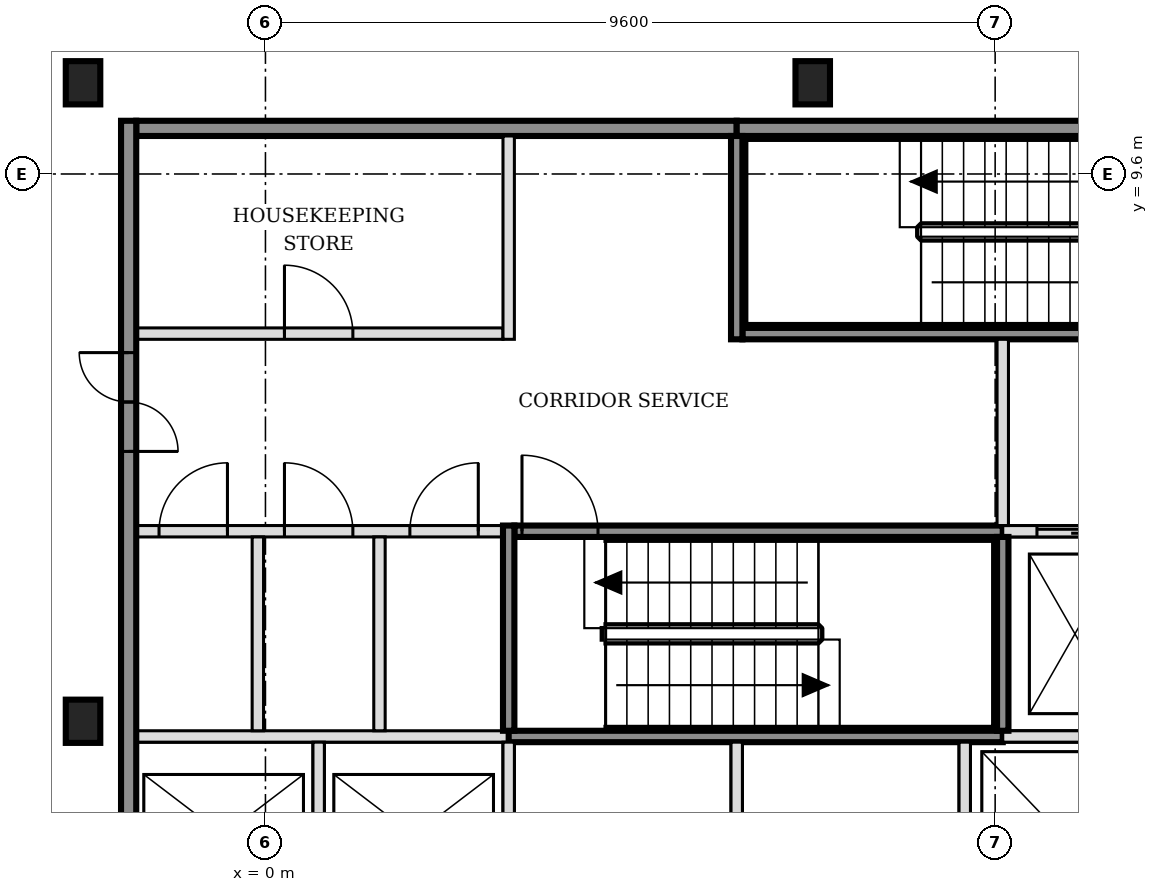
"""IFC4 building model, lengths in metres.
Left out: names, types, materials, properties, quantities, classifications, styles, units other than length and angle.
Written with IfcOpenShell. Run it as: python <this file> out.ifc"""

import sys

from ifc_helpers import new_model, si_unit, direction, frame, frame_2d, origin, origin_2d, place, context, subcontext, project, spatial, rectangle, i_section, extrude, element, fill, save


model = new_model("IFC4")
c1 = context("Model", 3, precision=1e-05, world=origin(), true_north=direction((0.0, 1.0)))
c2 = subcontext(c1, "Body", "Model", "MODEL_VIEW")
j1 = project(units=[si_unit("LENGTHUNIT", "METRE"), si_unit("PLANEANGLEUNIT", "RADIAN")], contexts=[c1])
p1 = place(None, origin())
s1 = spatial("IfcSite", under=j1, at=p1, CompositionType="ELEMENT")
p2 = place(p1, origin())
s2 = spatial("IfcBuilding", under=s1, at=p2, CompositionType="ELEMENT")
p3 = place(p2, frame((0.0, 0.0, 61.8)))
s3 = spatial("IfcBuildingStorey", under=s2, at=p3, CompositionType="ELEMENT", Elevation=61.8)
for number, where, z_axis, x_axis in (
    (1, (-2.4, 2.4, -0.15), (0.0, 0.0, 1.0), (1.0, 0.0, 0.0)),
    (2, (-2.4, 10.8, -0.15), (0.0, 0.0, 1.0), (1.0, 0.0, 0.0)),
    (3, (7.2, 10.8, -0.15), (0.0, 0.0, 1.0), (1.0, 0.0, 0.0)),
):
    element("IfcColumn", number, at=place(p3, frame(where, z_axis=z_axis, x_axis=x_axis)), inside=s3, PredefinedType="COLUMN", context=c2, shape_type="SweptSolid", body=[
        extrude(i_section(OverallWidth=0.454, OverallDepth=0.569, WebThickness=0.078, FlangeThickness=0.125, FilletRadius=0.015, at=origin_2d()), origin(), (0.0, 0.0, 1.0), 3.6),
    ])
p4 = place(p3, frame((-1.7, 2.2, 0.0), z_axis=(0.0, 0.0, 1.0), x_axis=(1.0, 0.0, 0.0)))
e4 = element("IfcWall", 4, at=p4, inside=s3, PredefinedType="SOLIDWALL", context=c2, shape_type="SweptSolid", body=[
    extrude(rectangle(XDim=4.9, YDim=0.15, at=frame_2d((2.45, 0.0))), origin(), (0.0, 0.0, 1.0), 3.45),
])
p5 = place(p3, frame((3.2, 2.2, 0.0), z_axis=(0.0, 0.0, 1.0), x_axis=(1.0, 0.0, 0.0)))
e5 = element("IfcWall", 5, at=p5, inside=s3, PredefinedType="SOLIDWALL", context=c2, shape_type="SweptSolid", body=[
    extrude(rectangle(XDim=6.5, YDim=0.15, at=frame_2d((3.25, 0.0))), origin(), (0.0, 0.0, 1.0), 3.45),
])
p6 = place(p3, frame((9.7, 2.2, 0.0), z_axis=(0.0, 0.0, 1.0), x_axis=(1.0, 0.0, 0.0)))
e6 = element("IfcWall", 6, at=p6, inside=s3, PredefinedType="SOLIDWALL", context=c2, shape_type="SweptSolid", body=[
    extrude(rectangle(XDim=4.525, YDim=0.15, at=frame_2d((2.263, 0.0))), origin(), (0.0, 0.0, 1.0), 3.45),
])
p7 = place(p3, frame((-1.7, 4.9, 0.0), z_axis=(0.0, 0.0, 1.0), x_axis=(1.0, 0.0, 0.0)))
e7 = element("IfcWall", 7, at=p7, inside=s3, PredefinedType="PARTITIONING", context=c2, shape_type="SweptSolid", body=[
    extrude(rectangle(XDim=4.825, YDim=0.15, at=frame_2d((2.413, 0.0))), origin(), (0.0, 0.0, 1.0), 3.45),
])
p8 = place(p7, frame((0.3, 0.0, 0.0)))
e8 = element("IfcOpeningElement", 8, at=p8, cuts=e7, PredefinedType="OPENING", context=c2, shape_type="SweptSolid", body=[
    extrude(rectangle(XDim=0.9, YDim=2.1, at=frame_2d((0.45, 1.05))), frame((0.0, 0.085, 0.0), z_axis=(0.0, -1.0, 0.0), x_axis=(1.0, 0.0, 0.0)), (0.0, 0.0, 1.0), 0.17),
])
p9 = place(p7, frame((1.95, 0.0, 0.0)))
e9 = element("IfcOpeningElement", 9, at=p9, cuts=e7, PredefinedType="OPENING", context=c2, shape_type="SweptSolid", body=[
    extrude(rectangle(XDim=0.9, YDim=2.1, at=frame_2d((0.45, 1.05))), frame((0.0, 0.085, 0.0), z_axis=(0.0, -1.0, 0.0), x_axis=(1.0, 0.0, 0.0)), (0.0, 0.0, 1.0), 0.17),
])
p10 = place(p7, frame((3.6, 0.0, 0.0)))
e10 = element("IfcOpeningElement", 10, at=p10, cuts=e7, PredefinedType="OPENING", context=c2, shape_type="SweptSolid", body=[
    extrude(rectangle(XDim=0.9, YDim=2.1, at=frame_2d((0.45, 1.05))), frame((0.0, 0.085, 0.0), z_axis=(0.0, -1.0, 0.0), x_axis=(1.0, 0.0, 0.0)), (0.0, 0.0, 1.0), 0.17),
])
p11 = place(p3, frame((3.275, 4.9, 0.0), z_axis=(0.0, 0.0, 1.0), x_axis=(1.0, 0.0, 0.0)))
e11 = element("IfcWall", 11, at=p11, inside=s3, PredefinedType="SOLIDWALL", context=c2, shape_type="SweptSolid", body=[
    extrude(rectangle(XDim=6.425, YDim=0.15, at=frame_2d((3.212, 0.0))), origin(), (0.0, 0.0, 1.0), 3.45),
])
p12 = place(p11, frame((0.1, 0.0, 0.0)))
e12 = element("IfcOpeningElement", 12, at=p12, cuts=e11, PredefinedType="OPENING", context=c2, shape_type="SweptSolid", body=[
    extrude(rectangle(XDim=1.0, YDim=2.1, at=frame_2d((0.5, 1.05))), frame((0.0, 0.085, 0.0), z_axis=(0.0, -1.0, 0.0), x_axis=(1.0, 0.0, 0.0)), (0.0, 0.0, 1.0), 0.17),
])
p13 = place(p3, frame((9.7, 4.9, 0.0), z_axis=(0.0, 0.0, 1.0), x_axis=(1.0, 0.0, 0.0)))
e13 = element("IfcWall", 13, at=p13, inside=s3, PredefinedType="SOLIDWALL", context=c2, shape_type="SweptSolid", body=[
    extrude(rectangle(XDim=6.4, YDim=0.15, at=frame_2d((3.2, 0.0))), origin(), (0.0, 0.0, 1.0), 3.45),
])
p14 = place(p13, frame((0.45, 0.0, 0.0)))
e14 = element("IfcOpeningElement", 14, at=p14, cuts=e13, PredefinedType="OPENING", context=c2, shape_type="SweptSolid", body=[
    extrude(rectangle(XDim=1.0, YDim=2.1, at=frame_2d((0.5, 1.05))), frame((0.0, 0.085, 0.0), z_axis=(0.0, -1.0, 0.0), x_axis=(1.0, 0.0, 0.0)), (0.0, 0.0, 1.0), 0.17),
])
p15 = place(p13, frame((2.35, 0.0, 0.0)))
e15 = element("IfcOpeningElement", 15, at=p15, cuts=e13, PredefinedType="OPENING", context=c2, shape_type="SweptSolid", body=[
    extrude(rectangle(XDim=1.0, YDim=2.1, at=frame_2d((0.5, 1.05))), frame((0.0, 0.085, 0.0), z_axis=(0.0, -1.0, 0.0), x_axis=(1.0, 0.0, 0.0)), (0.0, 0.0, 1.0), 0.17),
])
p16 = place(p13, frame((4.7, 0.0, 0.0)))
e16 = element("IfcOpeningElement", 16, at=p16, cuts=e13, PredefinedType="OPENING", context=c2, shape_type="SweptSolid", body=[
    extrude(rectangle(XDim=0.9, YDim=2.1, at=frame_2d((0.45, 1.05))), frame((0.0, 0.085, 0.0), z_axis=(0.0, -1.0, 0.0), x_axis=(1.0, 0.0, 0.0)), (0.0, 0.0, 1.0), 0.17),
])
p17 = place(p3, frame((-1.7, 7.5, 0.0), z_axis=(0.0, 0.0, 1.0), x_axis=(1.0, 0.0, 0.0)))
e17 = element("IfcWall", 17, at=p17, inside=s3, PredefinedType="PARTITIONING", context=c2, shape_type="SweptSolid", body=[
    extrude(rectangle(XDim=4.825, YDim=0.15, at=frame_2d((2.413, 0.0))), origin(), (0.0, 0.0, 1.0), 3.45),
])
p18 = place(p17, frame((1.95, 0.0, 0.0)))
e18 = element("IfcOpeningElement", 18, at=p18, cuts=e17, PredefinedType="OPENING", context=c2, shape_type="SweptSolid", body=[
    extrude(rectangle(XDim=0.9, YDim=2.1, at=frame_2d((0.45, 1.05))), frame((0.0, 0.085, 0.0), z_axis=(0.0, -1.0, 0.0), x_axis=(1.0, 0.0, 0.0)), (0.0, 0.0, 1.0), 0.17),
])
p19 = place(p3, frame((6.275, 7.5, 0.0), z_axis=(0.0, 0.0, 1.0), x_axis=(1.0, 0.0, 0.0)))
e19 = element("IfcWall", 19, at=p19, inside=s3, PredefinedType="SOLIDWALL", context=c2, shape_type="SweptSolid", body=[
    extrude(rectangle(XDim=6.425, YDim=0.15, at=frame_2d((3.212, 0.0))), origin(), (0.0, 0.0, 1.0), 3.45),
])
p20 = place(p19, frame((5.225, 0.0, 0.0)))
e20 = element("IfcOpeningElement", 20, at=p20, cuts=e19, PredefinedType="OPENING", context=c2, shape_type="SweptSolid", body=[
    extrude(rectangle(XDim=1.0, YDim=2.1, at=frame_2d((0.5, 1.05))), frame((0.0, 0.085, 0.0), z_axis=(0.0, -1.0, 0.0), x_axis=(1.0, 0.0, 0.0)), (0.0, 0.0, 1.0), 0.17),
])
p21 = place(p3, frame((-1.7, 10.2, 0.0), z_axis=(0.0, 0.0, 1.0), x_axis=(1.0, 0.0, 0.0)))
e21 = element("IfcWall", 21, at=p21, inside=s3, PredefinedType="SOLIDWALL", context=c2, shape_type="SweptSolid", body=[
    extrude(rectangle(XDim=7.9, YDim=0.2, at=frame_2d((3.95, 0.0))), origin(), (0.0, 0.0, 1.0), 3.45),
])
p22 = place(p3, frame((6.2, 10.2, 0.0), z_axis=(0.0, 0.0, 1.0), x_axis=(1.0, 0.0, 0.0)))
e22 = element("IfcWall", 22, at=p22, inside=s3, PredefinedType="SOLIDWALL", context=c2, shape_type="SweptSolid", body=[
    extrude(rectangle(XDim=6.5, YDim=0.2, at=frame_2d((3.25, 0.0))), origin(), (0.0, 0.0, 1.0), 3.45),
])
p23 = place(p3, frame((-1.8, -5.5, 0.0), z_axis=(0.0, 0.0, 1.0), x_axis=(0.0, 1.0, 0.0)))
e23 = element("IfcWall", 23, at=p23, inside=s3, PredefinedType="SOLIDWALL", context=c2, shape_type="SweptSolid", body=[
    extrude(rectangle(XDim=15.8, YDim=0.2, at=frame_2d((7.9, 0.0))), origin(), (0.0, 0.0, 1.0), 3.45),
])
p24 = place(p23, frame((3.05, 0.0, 0.0)))
e24 = element("IfcOpeningElement", 24, at=p24, cuts=e23, PredefinedType="OPENING", context=c2, shape_type="SweptSolid", body=[
    extrude(rectangle(XDim=1.3, YDim=2.1, at=frame_2d((0.65, 1.05))), frame((0.0, 0.11, 0.0), z_axis=(0.0, -1.0, 0.0), x_axis=(1.0, 0.0, 0.0)), (0.0, 0.0, 1.0), 0.22),
])
p25 = place(p23, frame((11.45, 0.0, 0.0)))
e25 = element("IfcOpeningElement", 25, at=p25, cuts=e23, PredefinedType="OPENING", context=c2, shape_type="SweptSolid", body=[
    extrude(rectangle(XDim=1.3, YDim=2.1, at=frame_2d((0.65, 1.05))), frame((0.0, 0.11, 0.0), z_axis=(0.0, -1.0, 0.0), x_axis=(1.0, 0.0, 0.0)), (0.0, 0.0, 1.0), 0.22),
])
p26 = place(p3, frame((-0.1, 2.275, 0.0), z_axis=(0.0, 0.0, 1.0), x_axis=(0.0, 1.0, 0.0)))
e26 = element("IfcWall", 26, at=p26, inside=s3, PredefinedType="PARTITIONING", context=c2, shape_type="SweptSolid", body=[
    extrude(rectangle(XDim=2.55, YDim=0.15, at=frame_2d((1.275, 0.0))), origin(), (0.0, 0.0, 1.0), 3.45),
])
p27 = place(p3, frame((0.7, -0.325, 0.0), z_axis=(0.0, 0.0, 1.0), x_axis=(0.0, 1.0, 0.0)))
e27 = element("IfcWall", 27, at=p27, inside=s3, PredefinedType="SOLIDWALL", context=c2, shape_type="SweptSolid", body=[
    extrude(rectangle(XDim=2.45, YDim=0.15, at=frame_2d((1.225, 0.0))), origin(), (0.0, 0.0, 1.0), 3.45),
])
p28 = place(p3, frame((1.5, 2.275, 0.0), z_axis=(0.0, 0.0, 1.0), x_axis=(0.0, 1.0, 0.0)))
e28 = element("IfcWall", 28, at=p28, inside=s3, PredefinedType="PARTITIONING", context=c2, shape_type="SweptSolid", body=[
    extrude(rectangle(XDim=2.55, YDim=0.15, at=frame_2d((1.275, 0.0))), origin(), (0.0, 0.0, 1.0), 3.45),
])
p29 = place(p3, frame((3.2, -0.325, 0.0), z_axis=(0.0, 0.0, 1.0), x_axis=(0.0, 1.0, 0.0)))
e29 = element("IfcWall", 29, at=p29, inside=s3, PredefinedType="SOLIDWALL", context=c2, shape_type="SweptSolid", body=[
    extrude(rectangle(XDim=2.45, YDim=0.15, at=frame_2d((1.225, 0.0))), origin(), (0.0, 0.0, 1.0), 3.45),
])
p30 = place(p3, frame((3.2, 2.275, 0.0), z_axis=(0.0, 0.0, 1.0), x_axis=(0.0, 1.0, 0.0)))
e30 = element("IfcWall", 30, at=p30, inside=s3, PredefinedType="SOLIDWALL", context=c2, shape_type="SweptSolid", body=[
    extrude(rectangle(XDim=2.7, YDim=0.15, at=frame_2d((1.35, 0.0))), origin(), (0.0, 0.0, 1.0), 3.45),
])
p31 = place(p3, frame((3.2, 7.425, 0.0), z_axis=(0.0, 0.0, 1.0), x_axis=(0.0, 1.0, 0.0)))
e31 = element("IfcWall", 31, at=p31, inside=s3, PredefinedType="PARTITIONING", context=c2, shape_type="SweptSolid", body=[
    extrude(rectangle(XDim=2.675, YDim=0.15, at=frame_2d((1.337, 0.0))), origin(), (0.0, 0.0, 1.0), 3.45),
])
p32 = place(p3, frame((6.2, -0.325, 0.0), z_axis=(0.0, 0.0, 1.0), x_axis=(0.0, 1.0, 0.0)))
e32 = element("IfcWall", 32, at=p32, inside=s3, PredefinedType="SOLIDWALL", context=c2, shape_type="SweptSolid", body=[
    extrude(rectangle(XDim=2.45, YDim=0.15, at=frame_2d((1.225, 0.0))), origin(), (0.0, 0.0, 1.0), 3.45),
])
p33 = place(p3, frame((6.2, 7.425, 0.0), z_axis=(0.0, 0.0, 1.0), x_axis=(0.0, 1.0, 0.0)))
e33 = element("IfcWall", 33, at=p33, inside=s3, PredefinedType="SOLIDWALL", context=c2, shape_type="SweptSolid", body=[
    extrude(rectangle(XDim=2.675, YDim=0.15, at=frame_2d((1.337, 0.0))), origin(), (0.0, 0.0, 1.0), 3.45),
])
p34 = place(p3, frame((9.2, -0.325, 0.0), z_axis=(0.0, 0.0, 1.0), x_axis=(0.0, 1.0, 0.0)))
e34 = element("IfcWall", 34, at=p34, inside=s3, PredefinedType="SOLIDWALL", context=c2, shape_type="SweptSolid", body=[
    extrude(rectangle(XDim=2.45, YDim=0.15, at=frame_2d((1.225, 0.0))), origin(), (0.0, 0.0, 1.0), 3.45),
])
p35 = place(p3, frame((9.7, 2.275, 0.0), z_axis=(0.0, 0.0, 1.0), x_axis=(0.0, 1.0, 0.0)))
e35 = element("IfcWall", 35, at=p35, inside=s3, PredefinedType="SOLIDWALL", context=c2, shape_type="SweptSolid", body=[
    extrude(rectangle(XDim=2.55, YDim=0.15, at=frame_2d((1.275, 0.0))), origin(), (0.0, 0.0, 1.0), 3.45),
])
p36 = place(p3, frame((9.7, 4.975, 0.0), z_axis=(0.0, 0.0, 1.0), x_axis=(0.0, 1.0, 0.0)))
e36 = element("IfcWall", 36, at=p36, inside=s3, PredefinedType="SOLIDWALL", context=c2, shape_type="SweptSolid", body=[
    extrude(rectangle(XDim=2.45, YDim=0.15, at=frame_2d((1.225, 0.0))), origin(), (0.0, 0.0, 1.0), 3.45),
])
p37 = place(p14, origin())
e37 = element("IfcDoor", 37, at=p37, inside=s3, OperationType="DOUBLE_DOOR_SLIDING", PredefinedType="DOOR", context=c2, shape_type="SweptSolid", body=[
    extrude(rectangle(XDim=1.0, YDim=2.1, at=frame_2d((0.5, 1.05))), frame((0.0, 0.025, 0.0), z_axis=(0.0, -1.0, 0.0), x_axis=(1.0, 0.0, 0.0)), (0.0, 0.0, 1.0), 0.05),
])
fill(e14, e37)
p38 = place(p12, origin())
e38 = element("IfcDoor", 38, at=p38, inside=s3, OperationType="SINGLE_SWING_LEFT", PredefinedType="DOOR", context=c2, shape_type="SweptSolid", body=[
    extrude(rectangle(XDim=1.0, YDim=2.1, at=frame_2d((0.5, 1.05))), frame((0.0, 0.025, 0.0), z_axis=(0.0, -1.0, 0.0), x_axis=(1.0, 0.0, 0.0)), (0.0, 0.0, 1.0), 0.05),
])
fill(e12, e38)
p39 = place(p25, origin())
e39 = element("IfcDoor", 39, at=p39, inside=s3, OperationType="DOUBLE_DOOR_SINGLE_SWING", PredefinedType="DOOR", context=c2, shape_type="SweptSolid", body=[
    extrude(rectangle(XDim=1.3, YDim=2.1, at=frame_2d((0.65, 1.05))), frame((0.0, 0.025, 0.0), z_axis=(0.0, -1.0, 0.0), x_axis=(1.0, 0.0, 0.0)), (0.0, 0.0, 1.0), 0.05),
])
fill(e25, e39)
p40 = place(p8, origin())
e40 = element("IfcDoor", 40, at=p40, inside=s3, OperationType="SINGLE_SWING_RIGHT", PredefinedType="DOOR", context=c2, shape_type="SweptSolid", body=[
    extrude(rectangle(XDim=0.9, YDim=2.1, at=frame_2d((0.45, 1.05))), frame((0.0, 0.025, 0.0), z_axis=(0.0, -1.0, 0.0), x_axis=(1.0, 0.0, 0.0)), (0.0, 0.0, 1.0), 0.05),
])
fill(e8, e40)
p41 = place(p9, origin())
e41 = element("IfcDoor", 41, at=p41, inside=s3, OperationType="SINGLE_SWING_LEFT", PredefinedType="DOOR", context=c2, shape_type="SweptSolid", body=[
    extrude(rectangle(XDim=0.9, YDim=2.1, at=frame_2d((0.45, 1.05))), frame((0.0, 0.025, 0.0), z_axis=(0.0, -1.0, 0.0), x_axis=(1.0, 0.0, 0.0)), (0.0, 0.0, 1.0), 0.05),
])
fill(e9, e41)
p42 = place(p10, origin())
e42 = element("IfcDoor", 42, at=p42, inside=s3, OperationType="SINGLE_SWING_RIGHT", PredefinedType="DOOR", context=c2, shape_type="SweptSolid", body=[
    extrude(rectangle(XDim=0.9, YDim=2.1, at=frame_2d((0.45, 1.05))), frame((0.0, 0.025, 0.0), z_axis=(0.0, -1.0, 0.0), x_axis=(1.0, 0.0, 0.0)), (0.0, 0.0, 1.0), 0.05),
])
fill(e10, e42)
p43 = place(p18, origin())
e43 = element("IfcDoor", 43, at=p43, inside=s3, OperationType="SINGLE_SWING_LEFT", PredefinedType="DOOR", context=c2, shape_type="SweptSolid", body=[
    extrude(rectangle(XDim=0.9, YDim=2.1, at=frame_2d((0.45, 1.05))), frame((0.0, 0.025, 0.0), z_axis=(0.0, -1.0, 0.0), x_axis=(1.0, 0.0, 0.0)), (0.0, 0.0, 1.0), 0.05),
])
fill(e18, e43)
save(model, sys.argv[1])
